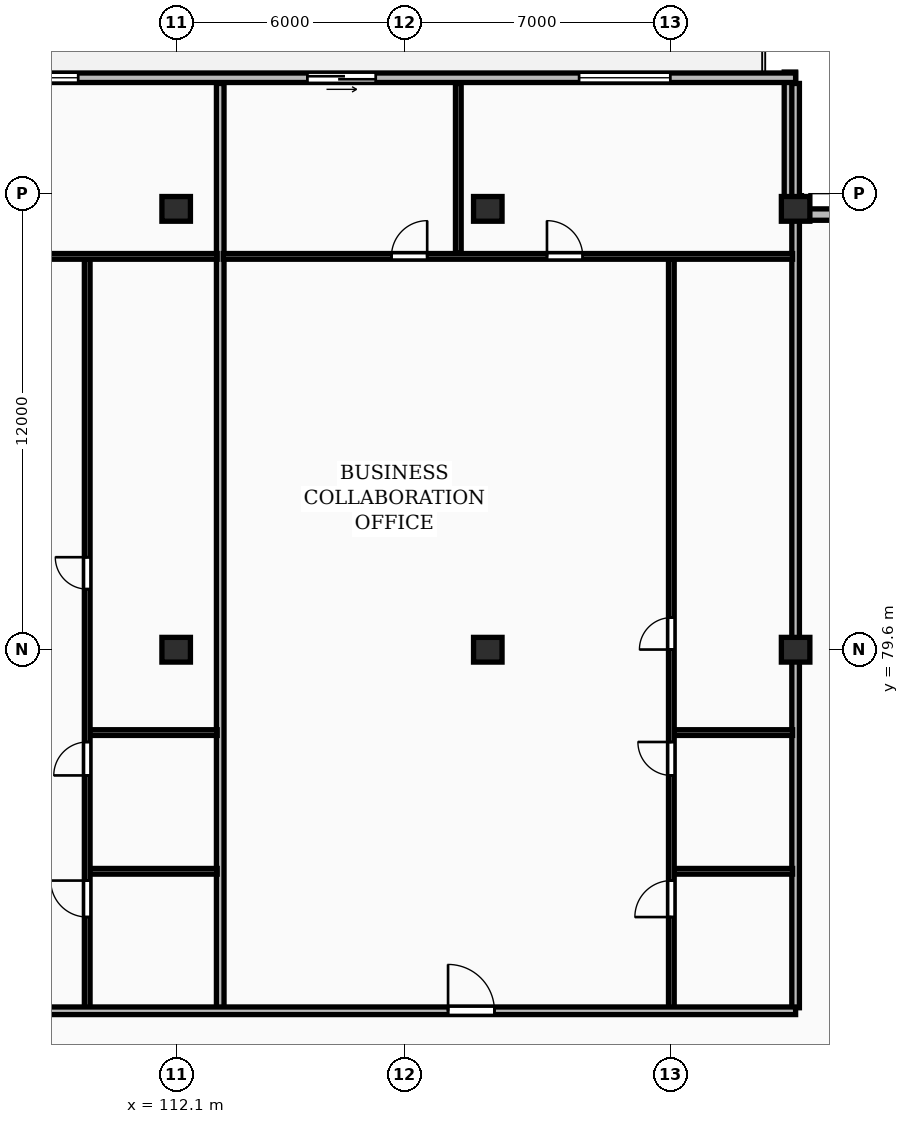
"""IFC4 building model, lengths in metres.
Left out: names, types, materials, properties, quantities, classifications, styles, units other than length and angle.
Written with IfcOpenShell. Run it as: python <this file> out.ifc"""

import sys

from ifc_helpers import new_model, si_unit, direction, frame, frame_2d, origin, origin_2d, place, context, subcontext, project, spatial, rectangle, extrude, element, fill, save


model = new_model("IFC4")
c1 = context("Model", 3, precision=1e-05, world=origin(), true_north=direction((0.0, 1.0)))
c2 = subcontext(c1, "Body", "Model", "MODEL_VIEW")
j1 = project(units=[si_unit("LENGTHUNIT", "METRE"), si_unit("PLANEANGLEUNIT", "RADIAN")], contexts=[c1])
p1 = place(None, origin())
s1 = spatial("IfcSite", under=j1, at=p1, CompositionType="ELEMENT")
p2 = place(p1, origin())
s2 = spatial("IfcBuilding", under=s1, at=p2, CompositionType="ELEMENT")
p3 = place(p2, frame((0.0, 0.0, 256.25)))
s3 = spatial("IfcBuildingStorey", under=s2, at=p3, CompositionType="ELEMENT", Elevation=256.25)
for number, where, z_axis, x_axis in (
    (1, (112.1, 79.6, 0.0), (0.0, 0.0, 1.0), (1.0, 0.0, 0.0)),
    (2, (112.1, 91.2, 0.0), (0.0, 0.0, 1.0), (1.0, 0.0, 0.0)),
    (3, (120.3, 79.6, 0.0), (0.0, 0.0, 1.0), (1.0, 0.0, 0.0)),
    (4, (120.3, 91.2, 0.0), (0.0, 0.0, 1.0), (1.0, 0.0, 0.0)),
    (5, (128.4, 79.6, 0.0), (0.0, 0.0, 1.0), (1.0, 0.0, 0.0)),
    (6, (128.4, 91.2, 0.0), (0.0, 0.0, 1.0), (1.0, 0.0, 0.0)),
):
    element("IfcColumn", number, at=place(p3, frame(where, z_axis=z_axis, x_axis=x_axis)), inside=s3, PredefinedType="COLUMN", context=c2, shape_type="SweptSolid", body=[
        extrude(rectangle(XDim=0.75, YDim=0.65, at=origin_2d()), origin(), (0.0, 0.0, 1.0), 3.45),
    ])
for number, where, z_axis, x_axis in (
    (7, (132.0, 91.05, 0.0), (0.0, 0.0, 1.0), (-1.0, 0.0, 0.0)),
    (8, (128.25, 91.2, 0.0), (0.0, 0.0, 1.0), (0.0, 1.0, 0.0)),
):
    element("IfcWall", number, at=place(p3, frame(where, z_axis=z_axis, x_axis=x_axis)), inside=s3, PredefinedType="STANDARD", context=c2, shape_type="SweptSolid", body=[
        extrude(rectangle(XDim=3.6, YDim=0.3, at=frame_2d((1.8, 0.0))), origin(), (0.0, 0.0, 1.0), 3.17),
    ])
p4 = place(p3, frame((128.4, 94.65, 0.0), z_axis=(0.0, 0.0, 1.0), x_axis=(-1.0, 0.0, 0.0)))
e9 = element("IfcWall", 9, at=p4, inside=s3, PredefinedType="STANDARD", context=c2, shape_type="SweptSolid", body=[
    extrude(rectangle(XDim=68.6, YDim=0.25, at=frame_2d((34.3, 0.0))), origin(), (0.0, 0.0, 1.0), 3.17),
])
p5 = place(p4, frame((60.248, 0.0, 0.85)))
e10 = element("IfcOpeningElement", 10, at=p5, cuts=e9, PredefinedType="OPENING", context=c2, shape_type="SweptSolid", body=[
    extrude(rectangle(XDim=2.4, YDim=1.9, at=frame_2d((1.2, 0.95))), frame((0.0, 0.135, 0.0), z_axis=(0.0, -1.0, 0.0), x_axis=(1.0, 0.0, 0.0)), (0.0, 0.0, 1.0), 0.27),
])
p6 = place(p4, frame((55.523, 0.0, 0.85)))
e11 = element("IfcOpeningElement", 11, at=p6, cuts=e9, PredefinedType="OPENING", context=c2, shape_type="SweptSolid", body=[
    extrude(rectangle(XDim=2.4, YDim=1.9, at=frame_2d((1.2, 0.95))), frame((0.0, 0.135, 0.0), z_axis=(0.0, -1.0, 0.0), x_axis=(1.0, 0.0, 0.0)), (0.0, 0.0, 1.0), 0.27),
])
p7 = place(p4, frame((65.245, 0.0, 0.0)))
e12 = element("IfcOpeningElement", 12, at=p7, cuts=e9, PredefinedType="OPENING", context=c2, shape_type="SweptSolid", body=[
    extrude(rectangle(XDim=1.8, YDim=2.2, at=frame_2d((0.9, 1.1))), frame((0.0, 0.135, 0.0), z_axis=(0.0, -1.0, 0.0), x_axis=(1.0, 0.0, 0.0)), (0.0, 0.0, 1.0), 0.27),
])
p8 = place(p4, frame((50.836, 0.0, 0.85)))
e13 = element("IfcOpeningElement", 13, at=p8, cuts=e9, PredefinedType="OPENING", context=c2, shape_type="SweptSolid", body=[
    extrude(rectangle(XDim=2.4, YDim=1.9, at=frame_2d((1.2, 0.95))), frame((0.0, 0.135, 0.0), z_axis=(0.0, -1.0, 0.0), x_axis=(1.0, 0.0, 0.0)), (0.0, 0.0, 1.0), 0.27),
])
p9 = place(p4, frame((39.76, 0.0, 0.85)))
e14 = element("IfcOpeningElement", 14, at=p9, cuts=e9, PredefinedType="OPENING", context=c2, shape_type="SweptSolid", body=[
    extrude(rectangle(XDim=1.8, YDim=1.8, at=frame_2d((0.9, 0.9))), frame((0.0, 0.135, 0.0), z_axis=(0.0, -1.0, 0.0), x_axis=(1.0, 0.0, 0.0)), (0.0, 0.0, 1.0), 0.27),
])
p10 = place(p4, frame((37.04, 0.0, 0.85)))
e15 = element("IfcOpeningElement", 15, at=p10, cuts=e9, PredefinedType="OPENING", context=c2, shape_type="SweptSolid", body=[
    extrude(rectangle(XDim=1.8, YDim=1.8, at=frame_2d((0.9, 0.9))), frame((0.0, 0.135, 0.0), z_axis=(0.0, -1.0, 0.0), x_axis=(1.0, 0.0, 0.0)), (0.0, 0.0, 1.0), 0.27),
])
p11 = place(p4, frame((44.845, 0.0, 0.0)))
e16 = element("IfcOpeningElement", 16, at=p11, cuts=e9, PredefinedType="OPENING", context=c2, shape_type="SweptSolid", body=[
    extrude(rectangle(XDim=1.8, YDim=2.2, at=frame_2d((0.9, 1.1))), frame((0.0, 0.135, 0.0), z_axis=(0.0, -1.0, 0.0), x_axis=(1.0, 0.0, 0.0)), (0.0, 0.0, 1.0), 0.27),
])
p12 = place(p4, frame((33.056, 0.0, 0.85)))
e17 = element("IfcOpeningElement", 17, at=p12, cuts=e9, PredefinedType="OPENING", context=c2, shape_type="SweptSolid", body=[
    extrude(rectangle(XDim=2.4, YDim=1.9, at=frame_2d((1.2, 0.95))), frame((0.0, 0.135, 0.0), z_axis=(0.0, -1.0, 0.0), x_axis=(1.0, 0.0, 0.0)), (0.0, 0.0, 1.0), 0.27),
])
p13 = place(p4, frame((27.394, 0.0, 0.0)))
e18 = element("IfcOpeningElement", 18, at=p13, cuts=e9, PredefinedType="OPENING", context=c2, shape_type="SweptSolid", body=[
    extrude(rectangle(XDim=1.8, YDim=2.2, at=frame_2d((0.9, 1.1))), frame((0.0, 0.135, 0.0), z_axis=(0.0, -1.0, 0.0), x_axis=(1.0, 0.0, 0.0)), (0.0, 0.0, 1.0), 0.27),
])
p14 = place(p4, frame((18.879, 0.0, 0.85)))
e19 = element("IfcOpeningElement", 19, at=p14, cuts=e9, PredefinedType="OPENING", context=c2, shape_type="SweptSolid", body=[
    extrude(rectangle(XDim=2.4, YDim=1.9, at=frame_2d((1.2, 0.95))), frame((0.0, 0.135, 0.0), z_axis=(0.0, -1.0, 0.0), x_axis=(1.0, 0.0, 0.0)), (0.0, 0.0, 1.0), 0.27),
])
p15 = place(p4, frame((11.048, 0.0, 0.0)))
e20 = element("IfcOpeningElement", 20, at=p15, cuts=e9, PredefinedType="OPENING", context=c2, shape_type="SweptSolid", body=[
    extrude(rectangle(XDim=1.8, YDim=2.2, at=frame_2d((0.9, 1.1))), frame((0.0, 0.135, 0.0), z_axis=(0.0, -1.0, 0.0), x_axis=(1.0, 0.0, 0.0)), (0.0, 0.0, 1.0), 0.27),
])
p16 = place(p4, frame((3.298, 0.0, 0.85)))
e21 = element("IfcOpeningElement", 21, at=p16, cuts=e9, PredefinedType="OPENING", context=c2, shape_type="SweptSolid", body=[
    extrude(rectangle(XDim=2.4, YDim=1.9, at=frame_2d((1.2, 0.95))), frame((0.0, 0.135, 0.0), z_axis=(0.0, -1.0, 0.0), x_axis=(1.0, 0.0, 0.0)), (0.0, 0.0, 1.0), 0.27),
])
p17 = place(p3, frame((128.4, 70.18, 0.0), z_axis=(0.0, 0.0, 1.0), x_axis=(0.0, 1.0, 0.0)))
e22 = element("IfcWall", 22, at=p17, inside=s3, PredefinedType="PARTITIONING", context=c2, shape_type="SweptSolid", body=[
    extrude(rectangle(XDim=24.32, YDim=0.2, at=frame_2d((12.16, 0.0))), origin(), (0.0, 0.0, 1.0), 2.477),
])
p18 = place(p3, frame((113.259, 70.18, 0.0), z_axis=(0.0, 0.0, 1.0), x_axis=(0.0, 1.0, 0.0)))
e23 = element("IfcWall", 23, at=p18, inside=s3, PredefinedType="PARTITIONING", context=c2, shape_type="SweptSolid", body=[
    extrude(rectangle(XDim=24.32, YDim=0.2, at=frame_2d((12.16, 0.0))), origin(), (0.0, 0.0, 1.0), 3.17),
])
for number, where, z_axis, x_axis in (
    (24, (109.819, 73.77, 0.0), (0.0, 0.0, 1.0), (1.0, 0.0, 0.0)),
    (25, (109.819, 77.42, 0.0), (0.0, 0.0, 1.0), (1.0, 0.0, 0.0)),
):
    element("IfcWall", number, at=place(p3, frame(where, z_axis=z_axis, x_axis=x_axis)), inside=s3, PredefinedType="PARTITIONING", context=c2, shape_type="SweptSolid", body=[
        extrude(rectangle(XDim=3.36, YDim=0.15, at=frame_2d((1.68, 0.0))), origin(), (0.0, 0.0, 1.0), 3.17),
    ])
p19 = place(p3, frame((109.759, 70.16, 0.0), z_axis=(0.0, 0.0, 1.0), x_axis=(0.0, 1.0, 0.0)))
e26 = element("IfcWall", 26, at=p19, inside=s3, PredefinedType="PARTITIONING", context=c2, shape_type="SweptSolid", body=[
    extrude(rectangle(XDim=19.73, YDim=0.15, at=frame_2d((9.865, 0.0))), origin(), (0.0, 0.0, 1.0), 3.17),
])
p20 = place(p19, frame((2.406, 0.0, 0.0)))
e27 = element("IfcOpeningElement", 27, at=p20, cuts=e26, PredefinedType="OPENING", context=c2, shape_type="SweptSolid", body=[
    extrude(rectangle(XDim=0.96, YDim=2.1, at=frame_2d((0.48, 1.05))), frame((0.0, 0.085, 0.0), z_axis=(0.0, -1.0, 0.0), x_axis=(1.0, 0.0, 0.0)), (0.0, 0.0, 1.0), 0.17),
])
p21 = place(p19, frame((6.133, 0.0, 0.0)))
e28 = element("IfcOpeningElement", 28, at=p21, cuts=e26, PredefinedType="OPENING", context=c2, shape_type="SweptSolid", body=[
    extrude(rectangle(XDim=0.88, YDim=2.06, at=frame_2d((0.44, 1.03))), frame((0.0, 0.085, 0.0), z_axis=(0.0, -1.0, 0.0), x_axis=(1.0, 0.0, 0.0)), (0.0, 0.0, 1.0), 0.17),
])
p22 = place(p19, frame((11.034, 0.0, 0.0)))
e29 = element("IfcOpeningElement", 29, at=p22, cuts=e26, PredefinedType="OPENING", context=c2, shape_type="SweptSolid", body=[
    extrude(rectangle(XDim=0.84, YDim=2.04, at=frame_2d((0.42, 1.02))), frame((0.0, 0.085, 0.0), z_axis=(0.0, -1.0, 0.0), x_axis=(1.0, 0.0, 0.0)), (0.0, 0.0, 1.0), 0.17),
])
p23 = place(p3, frame((96.669, 89.95, 0.0), z_axis=(0.0, 0.0, 1.0), x_axis=(1.0, 0.0, 0.0)))
e30 = element("IfcWall", 30, at=p23, inside=s3, PredefinedType="PARTITIONING", context=c2, shape_type="SweptSolid", body=[
    extrude(rectangle(XDim=16.51, YDim=0.15, at=frame_2d((8.255, 0.0))), origin(), (0.0, 0.0, 1.0), 3.17),
])
p24 = place(p23, frame((3.716, 0.0, 0.0)))
e31 = element("IfcOpeningElement", 31, at=p24, cuts=e30, PredefinedType="OPENING", context=c2, shape_type="SweptSolid", body=[
    extrude(rectangle(XDim=0.92, YDim=2.08, at=frame_2d((0.46, 1.04))), frame((0.0, 0.085, 0.0), z_axis=(0.0, -1.0, 0.0), x_axis=(1.0, 0.0, 0.0)), (0.0, 0.0, 1.0), 0.17),
])
p25 = place(p23, frame((7.795, 0.0, 0.0)))
e32 = element("IfcOpeningElement", 32, at=p25, cuts=e30, PredefinedType="OPENING", context=c2, shape_type="SweptSolid", body=[
    extrude(rectangle(XDim=0.92, YDim=2.08, at=frame_2d((0.46, 1.04))), frame((0.0, 0.085, 0.0), z_axis=(0.0, -1.0, 0.0), x_axis=(1.0, 0.0, 0.0)), (0.0, 0.0, 1.0), 0.17),
])
for number, where, z_axis, x_axis in (
    (33, (125.19, 73.77, 0.0), (0.0, 0.0, 1.0), (1.0, 0.0, 0.0)),
    (34, (125.19, 77.42, 0.0), (0.0, 0.0, 1.0), (1.0, 0.0, 0.0)),
):
    element("IfcWall", number, at=place(p3, frame(where, z_axis=z_axis, x_axis=x_axis)), inside=s3, PredefinedType="PARTITIONING", context=c2, shape_type="SweptSolid", body=[
        extrude(rectangle(XDim=3.13, YDim=0.15, at=frame_2d((1.565, 0.0))), origin(), (0.0, 0.0, 1.0), 3.17),
    ])
p26 = place(p3, frame((125.13, 70.16, 0.0), z_axis=(0.0, 0.0, 1.0), x_axis=(0.0, 1.0, 0.0)))
e35 = element("IfcWall", 35, at=p26, inside=s3, PredefinedType="PARTITIONING", context=c2, shape_type="SweptSolid", body=[
    extrude(rectangle(XDim=19.73, YDim=0.15, at=frame_2d((9.865, 0.0))), origin(), (0.0, 0.0, 1.0), 3.17),
])
p27 = place(p26, frame((2.406, 0.0, 0.0)))
e36 = element("IfcOpeningElement", 36, at=p27, cuts=e35, PredefinedType="OPENING", context=c2, shape_type="SweptSolid", body=[
    extrude(rectangle(XDim=0.96, YDim=2.1, at=frame_2d((0.48, 1.05))), frame((0.0, 0.085, 0.0), z_axis=(0.0, -1.0, 0.0), x_axis=(1.0, 0.0, 0.0)), (0.0, 0.0, 1.0), 0.17),
])
p28 = place(p26, frame((6.133, 0.0, 0.0)))
e37 = element("IfcOpeningElement", 37, at=p28, cuts=e35, PredefinedType="OPENING", context=c2, shape_type="SweptSolid", body=[
    extrude(rectangle(XDim=0.88, YDim=2.06, at=frame_2d((0.44, 1.03))), frame((0.0, 0.085, 0.0), z_axis=(0.0, -1.0, 0.0), x_axis=(1.0, 0.0, 0.0)), (0.0, 0.0, 1.0), 0.17),
])
p29 = place(p26, frame((9.445, 0.0, 0.0)))
e38 = element("IfcOpeningElement", 38, at=p29, cuts=e35, PredefinedType="OPENING", context=c2, shape_type="SweptSolid", body=[
    extrude(rectangle(XDim=0.84, YDim=2.04, at=frame_2d((0.42, 1.02))), frame((0.0, 0.085, 0.0), z_axis=(0.0, -1.0, 0.0), x_axis=(1.0, 0.0, 0.0)), (0.0, 0.0, 1.0), 0.17),
])
p30 = place(p3, frame((119.524, 90.03, 0.0), z_axis=(0.0, 0.0, 1.0), x_axis=(0.0, 1.0, 0.0)))
e39 = element("IfcWall", 39, at=p30, inside=s3, PredefinedType="PARTITIONING", context=c2, shape_type="SweptSolid", body=[
    extrude(rectangle(XDim=4.47, YDim=0.15, at=frame_2d((2.235, 0.0))), origin(), (0.0, 0.0, 1.0), 3.17),
])
p31 = place(p3, frame((113.339, 89.95, 0.0), z_axis=(0.0, 0.0, 1.0), x_axis=(1.0, 0.0, 0.0)))
e40 = element("IfcWall", 40, at=p31, inside=s3, PredefinedType="PARTITIONING", context=c2, shape_type="SweptSolid", body=[
    extrude(rectangle(XDim=14.981, YDim=0.15, at=frame_2d((7.49, 0.0))), origin(), (0.0, 0.0, 1.0), 3.17),
])
p32 = place(p31, frame((4.426, 0.0, 0.0)))
e41 = element("IfcOpeningElement", 41, at=p32, cuts=e40, PredefinedType="OPENING", context=c2, shape_type="SweptSolid", body=[
    extrude(rectangle(XDim=0.94, YDim=2.1, at=frame_2d((0.47, 1.05))), frame((0.0, 0.085, 0.0), z_axis=(0.0, -1.0, 0.0), x_axis=(1.0, 0.0, 0.0)), (0.0, 0.0, 1.0), 0.17),
])
p33 = place(p31, frame((8.518, 0.0, 0.0)))
e42 = element("IfcOpeningElement", 42, at=p33, cuts=e40, PredefinedType="OPENING", context=c2, shape_type="SweptSolid", body=[
    extrude(rectangle(XDim=0.94, YDim=2.1, at=frame_2d((0.47, 1.05))), frame((0.0, 0.085, 0.0), z_axis=(0.0, -1.0, 0.0), x_axis=(1.0, 0.0, 0.0)), (0.0, 0.0, 1.0), 0.17),
])
p34 = place(p3, frame((59.8, 70.1, 0.0), z_axis=(0.0, 0.0, 1.0), x_axis=(1.0, 0.0, 0.0)))
e43 = element("IfcWall", 43, at=p34, inside=s3, PredefinedType="PARTITIONING", context=c2, shape_type="SweptSolid", body=[
    extrude(rectangle(XDim=68.6, YDim=0.2, at=frame_2d((34.3, 0.0))), origin(), (0.0, 0.0, 1.0), 3.17),
])
p35 = place(p34, frame((2.045, 0.0, 0.0)))
e44 = element("IfcOpeningElement", 44, at=p35, cuts=e43, PredefinedType="OPENING", context=c2, shape_type="SweptSolid", body=[
    extrude(rectangle(XDim=0.95, YDim=2.15, at=frame_2d((0.475, 1.075))), frame((0.0, 0.11, 0.0), z_axis=(0.0, -1.0, 0.0), x_axis=(1.0, 0.0, 0.0)), (0.0, 0.0, 1.0), 0.22),
])
p36 = place(p34, frame((21.054, 0.0, 0.0)))
e45 = element("IfcOpeningElement", 45, at=p36, cuts=e43, PredefinedType="OPENING", context=c2, shape_type="SweptSolid", body=[
    extrude(rectangle(XDim=0.95, YDim=2.15, at=frame_2d((0.475, 1.075))), frame((0.0, 0.11, 0.0), z_axis=(0.0, -1.0, 0.0), x_axis=(1.0, 0.0, 0.0)), (0.0, 0.0, 1.0), 0.22),
])
p37 = place(p34, frame((43.434, 0.0, 0.0)))
e46 = element("IfcOpeningElement", 46, at=p37, cuts=e43, PredefinedType="OPENING", context=c2, shape_type="SweptSolid", body=[
    extrude(rectangle(XDim=1.22, YDim=2.18, at=frame_2d((0.61, 1.09))), frame((0.0, 0.11, 0.0), z_axis=(0.0, -1.0, 0.0), x_axis=(1.0, 0.0, 0.0)), (0.0, 0.0, 1.0), 0.22),
])
p38 = place(p34, frame((59.455, 0.0, 0.0)))
e47 = element("IfcOpeningElement", 47, at=p38, cuts=e43, PredefinedType="OPENING", context=c2, shape_type="SweptSolid", body=[
    extrude(rectangle(XDim=1.22, YDim=2.18, at=frame_2d((0.61, 1.09))), frame((0.0, 0.11, 0.0), z_axis=(0.0, -1.0, 0.0), x_axis=(1.0, 0.0, 0.0)), (0.0, 0.0, 1.0), 0.22),
])
p39 = place(p14, origin())
e48 = element("IfcWindow", 48, at=p39, inside=s3, PartitioningType="DOUBLE_PANEL_VERTICAL", PredefinedType="WINDOW", context=c2, shape_type="SweptSolid", body=[
    extrude(rectangle(XDim=2.4, YDim=1.9, at=frame_2d((1.2, 0.95))), frame((0.0, 0.03, 0.0), z_axis=(0.0, -1.0, 0.0), x_axis=(1.0, 0.0, 0.0)), (0.0, 0.0, 1.0), 0.06),
])
fill(e19, e48)
p40 = place(p15, origin())
e49 = element("IfcDoor", 49, at=p40, inside=s3, OperationType="SLIDING_TO_LEFT", PredefinedType="DOOR", context=c2, shape_type="SweptSolid", body=[
    extrude(rectangle(XDim=1.8, YDim=2.2, at=frame_2d((0.9, 1.1))), frame((0.0, 0.025, 0.0), z_axis=(0.0, -1.0, 0.0), x_axis=(1.0, 0.0, 0.0)), (0.0, 0.0, 1.0), 0.05),
])
fill(e20, e49)
p41 = place(p16, origin())
e50 = element("IfcWindow", 50, at=p41, inside=s3, PartitioningType="DOUBLE_PANEL_VERTICAL", PredefinedType="WINDOW", context=c2, shape_type="SweptSolid", body=[
    extrude(rectangle(XDim=2.4, YDim=1.9, at=frame_2d((1.2, 0.95))), frame((0.0, 0.03, 0.0), z_axis=(0.0, -1.0, 0.0), x_axis=(1.0, 0.0, 0.0)), (0.0, 0.0, 1.0), 0.06),
])
fill(e21, e50)
p42 = place(p20, origin())
e51 = element("IfcDoor", 51, at=p42, inside=s3, OperationType="SINGLE_SWING_RIGHT", PredefinedType="DOOR", context=c2, shape_type="SweptSolid", body=[
    extrude(rectangle(XDim=0.96, YDim=2.1, at=frame_2d((0.48, 1.05))), frame((0.0, 0.025, 0.0), z_axis=(0.0, -1.0, 0.0), x_axis=(1.0, 0.0, 0.0)), (0.0, 0.0, 1.0), 0.05),
])
fill(e27, e51)
p43 = place(p21, origin())
e52 = element("IfcDoor", 52, at=p43, inside=s3, OperationType="SINGLE_SWING_LEFT", PredefinedType="DOOR", context=c2, shape_type="SweptSolid", body=[
    extrude(rectangle(XDim=0.88, YDim=2.06, at=frame_2d((0.44, 1.03))), frame((0.0, 0.025, 0.0), z_axis=(0.0, -1.0, 0.0), x_axis=(1.0, 0.0, 0.0)), (0.0, 0.0, 1.0), 0.05),
])
fill(e28, e52)
p44 = place(p22, origin())
e53 = element("IfcDoor", 53, at=p44, inside=s3, OperationType="SINGLE_SWING_RIGHT", PredefinedType="DOOR", context=c2, shape_type="SweptSolid", body=[
    extrude(rectangle(XDim=0.84, YDim=2.04, at=frame_2d((0.42, 1.02))), frame((0.0, 0.025, 0.0), z_axis=(0.0, -1.0, 0.0), x_axis=(1.0, 0.0, 0.0)), (0.0, 0.0, 1.0), 0.05),
])
fill(e29, e53)
p45 = place(p27, origin())
e54 = element("IfcDoor", 54, at=p45, inside=s3, OperationType="SINGLE_SWING_LEFT", PredefinedType="DOOR", context=c2, shape_type="SweptSolid", body=[
    extrude(rectangle(XDim=0.96, YDim=2.1, at=frame_2d((0.48, 1.05))), frame((0.0, 0.025, 0.0), z_axis=(0.0, -1.0, 0.0), x_axis=(1.0, 0.0, 0.0)), (0.0, 0.0, 1.0), 0.05),
])
fill(e36, e54)
p46 = place(p28, origin())
e55 = element("IfcDoor", 55, at=p46, inside=s3, OperationType="SINGLE_SWING_RIGHT", PredefinedType="DOOR", context=c2, shape_type="SweptSolid", body=[
    extrude(rectangle(XDim=0.88, YDim=2.06, at=frame_2d((0.44, 1.03))), frame((0.0, 0.025, 0.0), z_axis=(0.0, -1.0, 0.0), x_axis=(1.0, 0.0, 0.0)), (0.0, 0.0, 1.0), 0.05),
])
fill(e37, e55)
p47 = place(p29, origin())
e56 = element("IfcDoor", 56, at=p47, inside=s3, OperationType="SINGLE_SWING_LEFT", PredefinedType="DOOR", context=c2, shape_type="SweptSolid", body=[
    extrude(rectangle(XDim=0.84, YDim=2.04, at=frame_2d((0.42, 1.02))), frame((0.0, 0.025, 0.0), z_axis=(0.0, -1.0, 0.0), x_axis=(1.0, 0.0, 0.0)), (0.0, 0.0, 1.0), 0.05),
])
fill(e38, e56)
p48 = place(p32, origin())
e57 = element("IfcDoor", 57, at=p48, inside=s3, OperationType="SINGLE_SWING_RIGHT", PredefinedType="DOOR", context=c2, shape_type="SweptSolid", body=[
    extrude(rectangle(XDim=0.94, YDim=2.1, at=frame_2d((0.47, 1.05))), frame((0.0, 0.025, 0.0), z_axis=(0.0, -1.0, 0.0), x_axis=(1.0, 0.0, 0.0)), (0.0, 0.0, 1.0), 0.05),
])
fill(e41, e57)
p49 = place(p33, origin())
e58 = element("IfcDoor", 58, at=p49, inside=s3, OperationType="SINGLE_SWING_LEFT", PredefinedType="DOOR", context=c2, shape_type="SweptSolid", body=[
    extrude(rectangle(XDim=0.94, YDim=2.1, at=frame_2d((0.47, 1.05))), frame((0.0, 0.025, 0.0), z_axis=(0.0, -1.0, 0.0), x_axis=(1.0, 0.0, 0.0)), (0.0, 0.0, 1.0), 0.05),
])
fill(e42, e58)
p50 = place(p38, origin())
e59 = element("IfcDoor", 59, at=p50, inside=s3, OperationType="SINGLE_SWING_LEFT", PredefinedType="DOOR", context=c2, shape_type="SweptSolid", body=[
    extrude(rectangle(XDim=1.22, YDim=2.18, at=frame_2d((0.61, 1.09))), frame((0.0, 0.025, 0.0), z_axis=(0.0, -1.0, 0.0), x_axis=(1.0, 0.0, 0.0)), (0.0, 0.0, 1.0), 0.05),
])
fill(e47, e59)
save(model, sys.argv[1])
